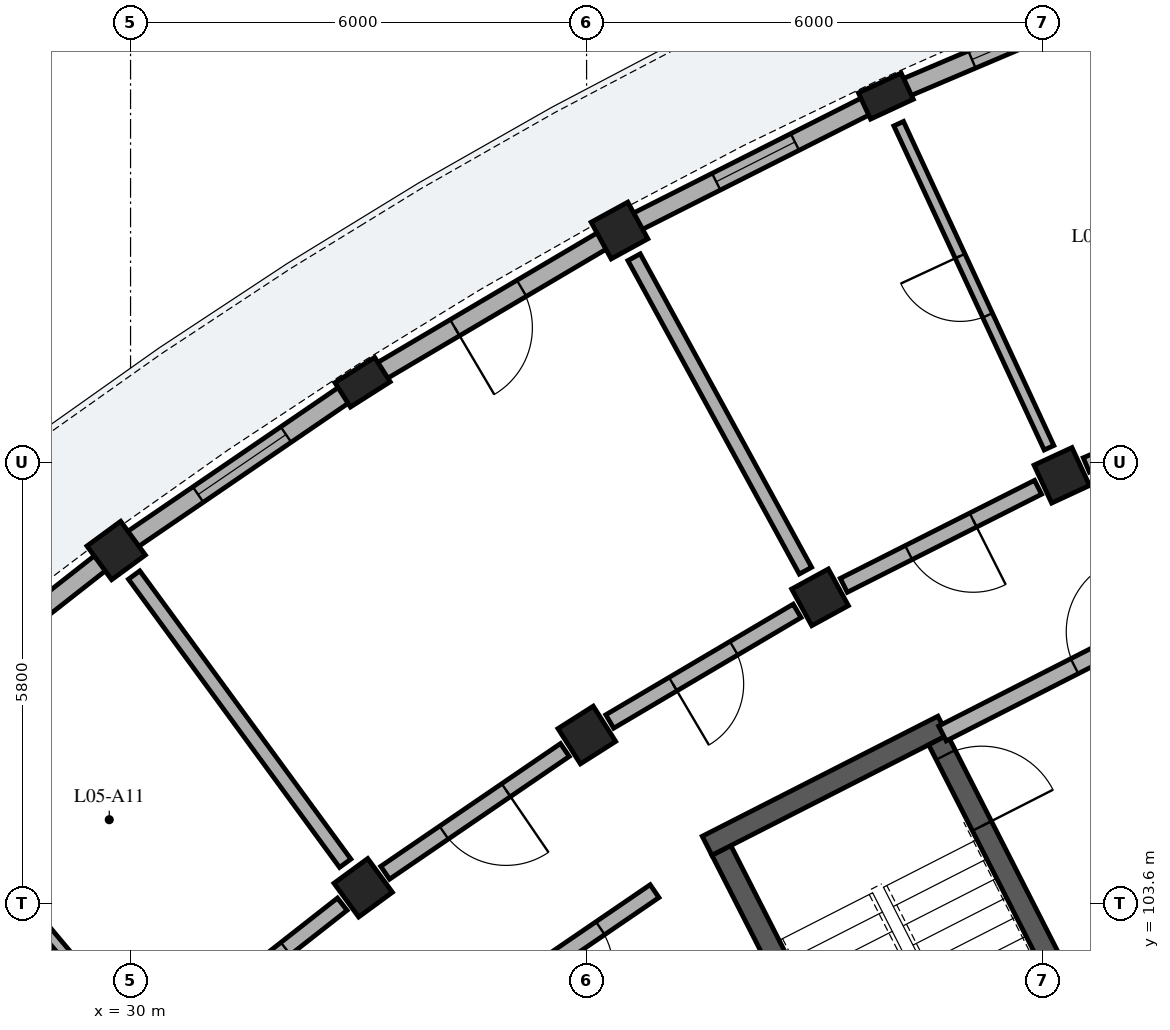
"""IFC4 building model, lengths in metres.
Left out: names, types, materials, properties, quantities, classifications, styles, units other than length and angle.
Written with IfcOpenShell. Run it as: python <this file> out.ifc"""

import sys

from ifc_helpers import new_model, si_unit, direction, frame, frame_2d, origin, origin_2d, place, context, subcontext, project, spatial, rectangle, extrude, element, fill, save


model = new_model("IFC4")
c1 = context("Model", 3, precision=1e-05, world=origin(), true_north=direction((0.0, 1.0)))
c2 = subcontext(c1, "Body", "Model", "MODEL_VIEW")
j1 = project(units=[si_unit("LENGTHUNIT", "METRE"), si_unit("PLANEANGLEUNIT", "RADIAN")], contexts=[c1])
p1 = place(None, origin())
s1 = spatial("IfcSite", under=j1, at=p1, CompositionType="ELEMENT")
p2 = place(p1, origin())
s2 = spatial("IfcBuilding", under=s1, at=p2, CompositionType="ELEMENT")
p3 = place(p2, frame((0.0, 0.0, 18.92)))
s3 = spatial("IfcBuildingStorey", under=s2, at=p3, CompositionType="ELEMENT", Elevation=18.92)
p4 = place(p3, frame((37.773, 104.296, 0.0), z_axis=(0.0, 0.0, 1.0), x_axis=(0.453992276384, -0.891005618941, 0.0)))
e1 = element("IfcWall", 1, at=p4, inside=s3, PredefinedType="SHEAR", context=c2, shape_type="SweptSolid", body=[
    extrude(rectangle(XDim=6.6, YDim=0.28, at=frame_2d((3.3, 0.0))), origin(), (0.0, 0.0, 1.0), 3.11),
])
p5 = place(p3, frame((37.585, 104.357, 0.0), z_axis=(0.0, 0.0, 1.0), x_axis=(0.891020222667, 0.453963613958, 0.0)))
e2 = element("IfcWall", 2, at=p5, inside=s3, PredefinedType="SHEAR", context=c2, shape_type="SweptSolid", body=[
    extrude(rectangle(XDim=3.48, YDim=0.28, at=frame_2d((1.74, 0.0))), origin(), (0.0, 0.0, 1.0), 3.11),
])
p6 = place(p3, frame((40.625, 105.748, 0.0), z_axis=(0.0, 0.0, 1.0), x_axis=(0.453992276384, -0.891005618941, 0.0)))
e3 = element("IfcWall", 3, at=p6, inside=s3, PredefinedType="SHEAR", context=c2, shape_type="SweptSolid", body=[
    extrude(rectangle(XDim=6.6, YDim=0.28, at=frame_2d((3.3, 0.0))), origin(), (0.0, 0.0, 1.0), 3.11),
])
p7 = place(p6, frame((0.22, 0.0, 0.0)))
e4 = element("IfcOpeningElement", 4, at=p7, cuts=e3, PredefinedType="OPENING", context=c2, shape_type="SweptSolid", body=[
    extrude(rectangle(XDim=1.05, YDim=2.15, at=frame_2d((0.525, 1.075))), frame((0.0, 0.15, 0.0), z_axis=(0.0, -1.0, 0.0), x_axis=(1.0, 0.0, 0.0)), (0.0, 0.0, 1.0), 0.3),
])
p8 = place(p3, frame((42.597, 102.561, 0.0), z_axis=(0.0, 0.0, 1.0), x_axis=(0.891001200497, 0.454000947921, 0.0)))
e5 = element("IfcWall", 5, at=p8, inside=s3, PredefinedType="SHEAR", context=c2, shape_type="SweptSolid", body=[
    extrude(rectangle(XDim=3.26, YDim=0.23, at=frame_2d((1.63, 0.0))), origin(), (0.0, 0.0, 1.0), 3.11),
])
p9 = place(p8, frame((0.9, 0.0, 0.0)))
e6 = element("IfcOpeningElement", 6, at=p9, cuts=e5, PredefinedType="OPENING", context=c2, shape_type="SweptSolid", body=[
    extrude(rectangle(XDim=1.1, YDim=2.15, at=frame_2d((0.55, 1.075))), frame((0.0, 0.125, 0.0), z_axis=(0.0, -1.0, 0.0), x_axis=(1.0, 0.0, 0.0)), (0.0, 0.0, 1.0), 0.25),
])
p10 = place(p3, frame((42.252, 109.23, 0.0), z_axis=(0.0, 0.0, 1.0), x_axis=(-0.420859924104, 0.907125638643, 0.0)))
e7 = element("IfcColumn", 7, at=p10, inside=s3, PredefinedType="COLUMN", context=c2, shape_type="SweptSolid", body=[
    extrude(rectangle(XDim=0.55, YDim=0.55, at=origin_2d()), origin(), (0.0, 0.0, 1.0), 3.11),
])
p11 = place(p3, frame((39.938, 114.219, 0.0), z_axis=(0.0, 0.0, 1.0), x_axis=(-0.420859924104, 0.907125638643, 0.0)))
e8 = element("IfcColumn", 8, at=p11, inside=s3, PredefinedType="PILASTER", context=c2, shape_type="SweptSolid", body=[
    extrude(rectangle(XDim=0.38, YDim=0.62, at=origin_2d()), origin(), (0.0, 0.0, 1.0), 3.11),
])
for number, where, z_axis, x_axis in (
    (9, (39.072, 107.625, 0.0), (0.0, 0.0, 1.0), (-0.48, 0.877, 0.0)),
    (10, (36.433, 112.451, 0.0), (0.0, 0.0, 1.0), (-0.48, 0.877, 0.0)),
    (11, (36.003, 105.813, 0.0), (0.0, 0.0, 1.0), (-0.536, 0.844, 0.0)),
):
    element("IfcColumn", number, at=place(p3, frame(where, z_axis=z_axis, x_axis=x_axis)), inside=s3, PredefinedType="COLUMN", context=c2, shape_type="SweptSolid", body=[
        extrude(rectangle(XDim=0.55, YDim=0.55, at=origin_2d()), origin(), (0.0, 0.0, 1.0), 3.11),
    ])
p12 = place(p3, frame((33.052, 110.455, 0.0), z_axis=(0.0, 0.0, 1.0), x_axis=(-0.536481603385, 0.843912015099, 0.0)))
e12 = element("IfcColumn", 12, at=p12, inside=s3, PredefinedType="PILASTER", context=c2, shape_type="SweptSolid", body=[
    extrude(rectangle(XDim=0.38, YDim=0.62, at=origin_2d()), origin(), (0.0, 0.0, 1.0), 3.11),
])
for number, where, z_axis, x_axis in (
    (13, (33.061, 103.804, 0.0), (0.0, 0.0, 1.0), (-0.591, 0.807, 0.0)),
    (14, (29.811, 108.241, 0.0), (0.0, 0.0, 1.0), (-0.591, 0.807, 0.0)),
):
    element("IfcColumn", number, at=place(p3, frame(where, z_axis=z_axis, x_axis=x_axis)), inside=s3, PredefinedType="COLUMN", context=c2, shape_type="SweptSolid", body=[
        extrude(rectangle(XDim=0.55, YDim=0.55, at=origin_2d()), origin(), (0.0, 0.0, 1.0), 3.11),
    ])
p13 = place(p3, frame((43.326, 115.657, 0.0), z_axis=(0.0, 0.0, 1.0), x_axis=(-0.920502438884, -0.390736816807, 0.0)))
e15 = element("IfcWall", 15, at=p13, inside=s3, PredefinedType="SOLIDWALL", context=c2, shape_type="SweptSolid", body=[
    extrude(rectangle(XDim=3.521, YDim=0.245, at=frame_2d((1.76, 0.0))), origin(), (0.0, 0.0, 1.0), 2.355),
])
p14 = place(p13, frame((1.07, 0.0, 0.55)))
e16 = element("IfcOpeningElement", 16, at=p14, cuts=e15, PredefinedType="OPENING", context=c2, shape_type="SweptSolid", body=[
    extrude(rectangle(XDim=1.38, YDim=1.56, at=frame_2d((0.69, 0.78))), frame((0.0, 0.133, 0.0), z_axis=(0.0, -1.0, 0.0), x_axis=(1.0, 0.0, 0.0)), (0.0, 0.0, 1.0), 0.265),
])
p15 = place(p3, frame((39.795, 114.147, 0.0), z_axis=(0.0, 0.0, 1.0), x_axis=(-0.892756700232, -0.450539092855, 0.0)))
e17 = element("IfcWall", 17, at=p15, inside=s3, PredefinedType="SOLIDWALL", context=c2, shape_type="SweptSolid", body=[
    extrude(rectangle(XDim=3.521, YDim=0.245, at=frame_2d((1.76, 0.0))), origin(), (0.0, 0.0, 1.0), 2.355),
])
p16 = place(p15, frame((1.18, 0.0, 0.55)))
e18 = element("IfcOpeningElement", 18, at=p16, cuts=e17, PredefinedType="OPENING", context=c2, shape_type="SweptSolid", body=[
    extrude(rectangle(XDim=1.16, YDim=1.485, at=frame_2d((0.58, 0.743))), frame((0.0, 0.133, 0.0), z_axis=(0.0, -1.0, 0.0), x_axis=(1.0, 0.0, 0.0)), (0.0, 0.0, 1.0), 0.265),
])
p17 = place(p3, frame((36.222, 112.326, 0.0), z_axis=(0.0, 0.0, 1.0), x_axis=(-0.861154218161, -0.50834379365, 0.0)))
e19 = element("IfcWall", 19, at=p17, inside=s3, PredefinedType="SOLIDWALL", context=c2, shape_type="SweptSolid", body=[
    extrude(rectangle(XDim=3.521, YDim=0.245, at=frame_2d((1.76, 0.0))), origin(), (0.0, 0.0, 1.0), 2.355),
])
p18 = place(p17, frame((1.25, 0.0, 0.0)))
e20 = element("IfcOpeningElement", 20, at=p18, cuts=e19, PredefinedType="OPENING", context=c2, shape_type="SweptSolid", body=[
    extrude(rectangle(XDim=1.02, YDim=2.14, at=frame_2d((0.51, 1.07))), frame((0.0, 0.133, 0.0), z_axis=(0.0, -1.0, 0.0), x_axis=(1.0, 0.0, 0.0)), (0.0, 0.0, 1.0), 0.265),
])
p19 = place(p3, frame((32.92, 110.365, 0.0), z_axis=(0.0, 0.0, 1.0), x_axis=(-0.825745840472, -0.56404238045, 0.0)))
e21 = element("IfcWall", 21, at=p19, inside=s3, PredefinedType="SOLIDWALL", context=c2, shape_type="SweptSolid", body=[
    extrude(rectangle(XDim=3.521, YDim=0.245, at=frame_2d((1.76, 0.0))), origin(), (0.0, 0.0, 1.0), 2.355),
])
p20 = place(p19, frame((1.06, 0.0, 0.35)))
e22 = element("IfcOpeningElement", 22, at=p20, cuts=e21, PredefinedType="OPENING", context=c2, shape_type="SweptSolid", body=[
    extrude(rectangle(XDim=1.4, YDim=1.635, at=frame_2d((0.7, 0.817))), frame((0.0, 0.133, 0.0), z_axis=(0.0, -1.0, 0.0), x_axis=(1.0, 0.0, 0.0)), (0.0, 0.0, 1.0), 0.265),
])
p21 = place(p3, frame((29.618, 108.09, 0.0), z_axis=(0.0, 0.0, 1.0), x_axis=(-0.786813798172, -0.617190446301, 0.0)))
e23 = element("IfcWall", 23, at=p21, inside=s3, PredefinedType="SOLIDWALL", context=c2, shape_type="SweptSolid", body=[
    extrude(rectangle(XDim=3.521, YDim=0.245, at=frame_2d((1.76, 0.0))), origin(), (0.0, 0.0, 1.0), 2.355),
])
p22 = place(p21, frame((1.0, 0.0, 0.55)))
e24 = element("IfcOpeningElement", 24, at=p22, cuts=e23, PredefinedType="OPENING", context=c2, shape_type="SweptSolid", body=[
    extrude(rectangle(XDim=1.52, YDim=1.485, at=frame_2d((0.76, 0.743))), frame((0.0, 0.133, 0.0), z_axis=(0.0, -1.0, 0.0), x_axis=(1.0, 0.0, 0.0)), (0.0, 0.0, 1.0), 0.265),
])
p23 = place(p3, frame((40.682, 105.834, 0.0), z_axis=(0.0, 0.0, 1.0), x_axis=(0.891003372311, 0.453996685595, 0.0)))
e25 = element("IfcWall", 25, at=p23, inside=s3, PredefinedType="PARTITIONING", context=c2, shape_type="SweptSolid", body=[
    extrude(rectangle(XDim=4.9, YDim=0.22, at=frame_2d((2.45, 0.0))), origin(), (0.0, 0.0, 1.0), 2.34),
])
p24 = place(p23, frame((1.95, 0.0, 0.0)))
e26 = element("IfcOpeningElement", 26, at=p24, cuts=e25, PredefinedType="OPENING", context=c2, shape_type="SweptSolid", body=[
    extrude(rectangle(XDim=1.0, YDim=2.15, at=frame_2d((0.5, 1.075))), frame((0.0, 0.12, 0.0), z_axis=(0.0, -1.0, 0.0), x_axis=(1.0, 0.0, 0.0)), (0.0, 0.0, 1.0), 0.24),
])
p25 = place(p3, frame((45.21, 110.486, 0.0), z_axis=(0.0, 0.0, 1.0), x_axis=(-0.920511160294, -0.390716270168, 0.0)))
e27 = element("IfcWall", 27, at=p25, inside=s3, PredefinedType="PARTITIONING", context=c2, shape_type="SweptSolid", body=[
    extrude(rectangle(XDim=2.863, YDim=0.205, at=frame_2d((1.432, 0.0))), origin(), (0.0, 0.0, 1.0), 2.37),
])
p26 = place(p25, frame((0.947, 0.0, 0.0)))
e28 = element("IfcOpeningElement", 28, at=p26, cuts=e27, PredefinedType="OPENING", context=c2, shape_type="SweptSolid", body=[
    extrude(rectangle(XDim=0.97, YDim=2.15, at=frame_2d((0.485, 1.075))), frame((0.0, 0.113, 0.0), z_axis=(0.0, -1.0, 0.0), x_axis=(1.0, 0.0, 0.0)), (0.0, 0.0, 1.0), 0.225),
])
p27 = place(p3, frame((42.084, 109.593, 0.0), z_axis=(0.0, 0.0, 1.0), x_axis=(-0.420862519045, 0.907124434718, 0.0)))
e29 = element("IfcWall", 29, at=p27, inside=s3, PredefinedType="PLUMBINGWALL", context=c2, shape_type="SweptSolid", body=[
    extrude(rectangle(XDim=4.7, YDim=0.14, at=frame_2d((2.35, 0.0))), origin(), (0.0, 0.0, 1.0), 2.37),
])
p28 = place(p27, frame((1.92, 0.0, 0.0)))
e30 = element("IfcOpeningElement", 30, at=p28, cuts=e29, PredefinedType="OPENING", context=c2, shape_type="SweptSolid", body=[
    extrude(rectangle(XDim=0.86, YDim=2.06, at=frame_2d((0.43, 1.03))), frame((0.0, 0.08, 0.0), z_axis=(0.0, -1.0, 0.0), x_axis=(1.0, 0.0, 0.0)), (0.0, 0.0, 1.0), 0.16),
])
p29 = place(p3, frame((41.94, 109.073, 0.0), z_axis=(0.0, 0.0, 1.0), x_axis=(-0.89273239336, -0.450587254419, 0.0)))
e31 = element("IfcWall", 31, at=p29, inside=s3, PredefinedType="PARTITIONING", context=c2, shape_type="SweptSolid", body=[
    extrude(rectangle(XDim=2.863, YDim=0.205, at=frame_2d((1.432, 0.0))), origin(), (0.0, 0.0, 1.0), 2.37),
])
p30 = place(p29, frame((0.957, 0.0, 0.0)))
e32 = element("IfcOpeningElement", 32, at=p30, cuts=e31, PredefinedType="OPENING", context=c2, shape_type="SweptSolid", body=[
    extrude(rectangle(XDim=0.95, YDim=2.13, at=frame_2d((0.475, 1.065))), frame((0.0, 0.113, 0.0), z_axis=(0.0, -1.0, 0.0), x_axis=(1.0, 0.0, 0.0)), (0.0, 0.0, 1.0), 0.225),
])
p31 = place(p3, frame((38.88, 107.976, 0.0), z_axis=(0.0, 0.0, 1.0), x_axis=(-0.479721743761, 0.877420679357, 0.0)))
e33 = element("IfcWall", 33, at=p31, inside=s3, PredefinedType="PARTITIONING", context=c2, shape_type="SweptSolid", body=[
    extrude(rectangle(XDim=4.7, YDim=0.185, at=frame_2d((2.35, 0.0))), origin(), (0.0, 0.0, 1.0), 2.37),
])
p32 = place(p3, frame((38.77, 107.447, 0.0), z_axis=(0.0, 0.0, 1.0), x_axis=(-0.861113214678, -0.508413248753, 0.0)))
e34 = element("IfcWall", 34, at=p32, inside=s3, PredefinedType="PARTITIONING", context=c2, shape_type="SweptSolid", body=[
    extrude(rectangle(XDim=2.863, YDim=0.205, at=frame_2d((1.432, 0.0))), origin(), (0.0, 0.0, 1.0), 2.37),
])
p33 = place(p32, frame((0.967, 0.0, 0.0)))
e35 = element("IfcOpeningElement", 35, at=p33, cuts=e34, PredefinedType="OPENING", context=c2, shape_type="SweptSolid", body=[
    extrude(rectangle(XDim=0.93, YDim=2.12, at=frame_2d((0.465, 1.06))), frame((0.0, 0.113, 0.0), z_axis=(0.0, -1.0, 0.0), x_axis=(1.0, 0.0, 0.0)), (0.0, 0.0, 1.0), 0.225),
])
p34 = place(p3, frame((35.714, 105.616, 0.0), z_axis=(0.0, 0.0, 1.0), x_axis=(-0.825779671787, -0.563992848947, 0.0)))
e36 = element("IfcWall", 36, at=p34, inside=s3, PredefinedType="PARTITIONING", context=c2, shape_type="SweptSolid", body=[
    extrude(rectangle(XDim=2.863, YDim=0.205, at=frame_2d((1.432, 0.0))), origin(), (0.0, 0.0, 1.0), 2.37),
])
p35 = place(p34, frame((0.937, 0.0, 0.0)))
e37 = element("IfcOpeningElement", 37, at=p35, cuts=e36, PredefinedType="OPENING", context=c2, shape_type="SweptSolid", body=[
    extrude(rectangle(XDim=0.99, YDim=2.16, at=frame_2d((0.495, 1.08))), frame((0.0, 0.113, 0.0), z_axis=(0.0, -1.0, 0.0), x_axis=(1.0, 0.0, 0.0)), (0.0, 0.0, 1.0), 0.225),
])
p36 = place(p3, frame((36.895, 103.76, 0.0), z_axis=(0.0, 0.0, 1.0), x_axis=(-0.825752009056, -0.56403334967, 0.0)))
e38 = element("IfcWall", 38, at=p36, inside=s3, PredefinedType="PARTITIONING", context=c2, shape_type="SweptSolid", body=[
    extrude(rectangle(XDim=2.718, YDim=0.205, at=frame_2d((1.359, 0.0))), origin(), (0.0, 0.0, 1.0), 2.37),
])
p37 = place(p36, frame((0.864, 0.0, 0.0)))
e39 = element("IfcOpeningElement", 39, at=p37, cuts=e38, PredefinedType="OPENING", context=c2, shape_type="SweptSolid", body=[
    extrude(rectangle(XDim=0.99, YDim=2.16, at=frame_2d((0.495, 1.08))), frame((0.0, 0.113, 0.0), z_axis=(0.0, -1.0, 0.0), x_axis=(1.0, 0.0, 0.0)), (0.0, 0.0, 1.0), 0.225),
])
p38 = place(p3, frame((32.824, 104.126, 0.0), z_axis=(0.0, 0.0, 1.0), x_axis=(-0.590910940129, 0.806736797745, 0.0)))
e40 = element("IfcWall", 40, at=p38, inside=s3, PredefinedType="PARTITIONING", context=c2, shape_type="SweptSolid", body=[
    extrude(rectangle(XDim=4.7, YDim=0.185, at=frame_2d((2.35, 0.0))), origin(), (0.0, 0.0, 1.0), 2.37),
])
p39 = place(p3, frame((32.785, 103.588, 0.0), z_axis=(0.0, 0.0, 1.0), x_axis=(-0.786806323554, -0.617199975061, 0.0)))
e41 = element("IfcWall", 41, at=p39, inside=s3, PredefinedType="PARTITIONING", context=c2, shape_type="SweptSolid", body=[
    extrude(rectangle(XDim=2.863, YDim=0.205, at=frame_2d((1.432, 0.0))), origin(), (0.0, 0.0, 1.0), 2.37),
])
p40 = place(p39, frame((0.947, 0.0, 0.0)))
e42 = element("IfcOpeningElement", 42, at=p40, cuts=e41, PredefinedType="OPENING", context=c2, shape_type="SweptSolid", body=[
    extrude(rectangle(XDim=0.97, YDim=2.15, at=frame_2d((0.485, 1.075))), frame((0.0, 0.113, 0.0), z_axis=(0.0, -1.0, 0.0), x_axis=(1.0, 0.0, 0.0)), (0.0, 0.0, 1.0), 0.225),
])
p41 = place(p3, frame((30.0, 101.911, 0.0), z_axis=(0.0, 0.0, 1.0), x_axis=(-0.642811926223, 0.766024038465, 0.0)))
e43 = element("IfcWall", 43, at=p41, inside=s3, PredefinedType="PLUMBINGWALL", context=c2, shape_type="SweptSolid", body=[
    extrude(rectangle(XDim=4.7, YDim=0.14, at=frame_2d((2.35, 0.0))), origin(), (0.0, 0.0, 1.0), 2.37),
])
p42 = place(p41, frame((1.92, 0.0, 0.0)))
e44 = element("IfcOpeningElement", 44, at=p42, cuts=e43, PredefinedType="OPENING", context=c2, shape_type="SweptSolid", body=[
    extrude(rectangle(XDim=0.86, YDim=2.06, at=frame_2d((0.43, 1.03))), frame((0.0, 0.08, 0.0), z_axis=(0.0, -1.0, 0.0), x_axis=(1.0, 0.0, 0.0)), (0.0, 0.0, 1.0), 0.16),
])
p43 = place(p14, origin())
e45 = element("IfcWindow", 45, at=p43, inside=s3, PartitioningType="SINGLE_PANEL", PredefinedType="WINDOW", context=c2, shape_type="SweptSolid", body=[
    extrude(rectangle(XDim=1.38, YDim=1.56, at=frame_2d((0.69, 0.78))), frame((0.0, 0.03, 0.0), z_axis=(0.0, -1.0, 0.0), x_axis=(1.0, 0.0, 0.0)), (0.0, 0.0, 1.0), 0.06),
])
fill(e16, e45)
p44 = place(p16, origin())
e46 = element("IfcWindow", 46, at=p44, inside=s3, PartitioningType="SINGLE_PANEL", PredefinedType="WINDOW", context=c2, shape_type="SweptSolid", body=[
    extrude(rectangle(XDim=1.16, YDim=1.485, at=frame_2d((0.58, 0.743))), frame((0.0, 0.03, 0.0), z_axis=(0.0, -1.0, 0.0), x_axis=(1.0, 0.0, 0.0)), (0.0, 0.0, 1.0), 0.06),
])
fill(e18, e46)
p45 = place(p18, origin())
e47 = element("IfcDoor", 47, at=p45, inside=s3, OperationType="SINGLE_SWING_RIGHT", PredefinedType="DOOR", context=c2, shape_type="SweptSolid", body=[
    extrude(rectangle(XDim=1.02, YDim=2.14, at=frame_2d((0.51, 1.07))), frame((0.0, 0.025, 0.0), z_axis=(0.0, -1.0, 0.0), x_axis=(1.0, 0.0, 0.0)), (0.0, 0.0, 1.0), 0.05),
])
fill(e20, e47)
p46 = place(p20, origin())
e48 = element("IfcWindow", 48, at=p46, inside=s3, PartitioningType="SINGLE_PANEL", PredefinedType="WINDOW", context=c2, shape_type="SweptSolid", body=[
    extrude(rectangle(XDim=1.4, YDim=1.635, at=frame_2d((0.7, 0.817))), frame((0.0, 0.03, 0.0), z_axis=(0.0, -1.0, 0.0), x_axis=(1.0, 0.0, 0.0)), (0.0, 0.0, 1.0), 0.06),
])
fill(e22, e48)
p47 = place(p7, origin())
e49 = element("IfcDoor", 49, at=p47, inside=s3, OperationType="SINGLE_SWING_RIGHT", PredefinedType="DOOR", context=c2, shape_type="SweptSolid", body=[
    extrude(rectangle(XDim=1.05, YDim=2.15, at=frame_2d((0.525, 1.075))), frame((0.0, 0.025, 0.0), z_axis=(0.0, -1.0, 0.0), x_axis=(1.0, 0.0, 0.0)), (0.0, 0.0, 1.0), 0.05),
])
fill(e4, e49)
p48 = place(p24, origin())
e50 = element("IfcDoor", 50, at=p48, inside=s3, OperationType="SINGLE_SWING_RIGHT", PredefinedType="DOOR", context=c2, shape_type="SweptSolid", body=[
    extrude(rectangle(XDim=1.0, YDim=2.15, at=frame_2d((0.5, 1.075))), frame((0.0, 0.025, 0.0), z_axis=(0.0, -1.0, 0.0), x_axis=(1.0, 0.0, 0.0)), (0.0, 0.0, 1.0), 0.05),
])
fill(e26, e50)
p49 = place(p28, origin())
e51 = element("IfcDoor", 51, at=p49, inside=s3, OperationType="SINGLE_SWING_RIGHT", PredefinedType="DOOR", context=c2, shape_type="SweptSolid", body=[
    extrude(rectangle(XDim=0.86, YDim=2.06, at=frame_2d((0.43, 1.03))), frame((0.0, 0.025, 0.0), z_axis=(0.0, -1.0, 0.0), x_axis=(1.0, 0.0, 0.0)), (0.0, 0.0, 1.0), 0.05),
])
fill(e30, e51)
p50 = place(p30, origin())
e52 = element("IfcDoor", 52, at=p50, inside=s3, OperationType="SINGLE_SWING_LEFT", PredefinedType="DOOR", context=c2, shape_type="SweptSolid", body=[
    extrude(rectangle(XDim=0.95, YDim=2.13, at=frame_2d((0.475, 1.065))), frame((0.0, 0.025, 0.0), z_axis=(0.0, -1.0, 0.0), x_axis=(1.0, 0.0, 0.0)), (0.0, 0.0, 1.0), 0.05),
])
fill(e32, e52)
p51 = place(p33, origin())
e53 = element("IfcDoor", 53, at=p51, inside=s3, OperationType="SINGLE_SWING_RIGHT", PredefinedType="DOOR", context=c2, shape_type="SweptSolid", body=[
    extrude(rectangle(XDim=0.93, YDim=2.12, at=frame_2d((0.465, 1.06))), frame((0.0, 0.025, 0.0), z_axis=(0.0, -1.0, 0.0), x_axis=(1.0, 0.0, 0.0)), (0.0, 0.0, 1.0), 0.05),
])
fill(e35, e53)
p52 = place(p35, origin())
e54 = element("IfcDoor", 54, at=p52, inside=s3, OperationType="SINGLE_SWING_LEFT", PredefinedType="DOOR", context=c2, shape_type="SweptSolid", body=[
    extrude(rectangle(XDim=0.99, YDim=2.16, at=frame_2d((0.495, 1.08))), frame((0.0, 0.025, 0.0), z_axis=(0.0, -1.0, 0.0), x_axis=(1.0, 0.0, 0.0)), (0.0, 0.0, 1.0), 0.05),
])
fill(e37, e54)
p53 = place(p37, origin())
e55 = element("IfcDoor", 55, at=p53, inside=s3, OperationType="SINGLE_SWING_RIGHT", PredefinedType="DOOR", context=c2, shape_type="SweptSolid", body=[
    extrude(rectangle(XDim=0.99, YDim=2.16, at=frame_2d((0.495, 1.08))), frame((0.0, 0.025, 0.0), z_axis=(0.0, -1.0, 0.0), x_axis=(1.0, 0.0, 0.0)), (0.0, 0.0, 1.0), 0.05),
])
fill(e39, e55)
p54 = place(p40, origin())
e56 = element("IfcDoor", 56, at=p54, inside=s3, OperationType="SINGLE_SWING_RIGHT", PredefinedType="DOOR", context=c2, shape_type="SweptSolid", body=[
    extrude(rectangle(XDim=0.97, YDim=2.15, at=frame_2d((0.485, 1.075))), frame((0.0, 0.025, 0.0), z_axis=(0.0, -1.0, 0.0), x_axis=(1.0, 0.0, 0.0)), (0.0, 0.0, 1.0), 0.05),
])
fill(e42, e56)
save(model, sys.argv[1])
